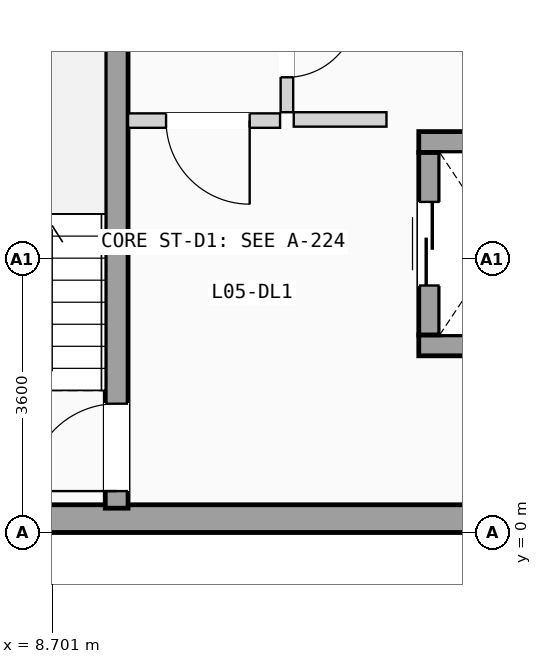
"""IFC4 building model, lengths in metres.
Left out: names, types, materials, properties, quantities, classifications, styles, units other than length and angle.
Written with IfcOpenShell. Run it as: python <this file> out.ifc"""

import sys

from ifc_helpers import new_model, si_unit, direction, frame, frame_2d, origin, place, context, subcontext, project, spatial, rectangle, extrude, element, fill, save


model = new_model("IFC4")
c1 = context("Model", 3, precision=1e-05, world=origin(), true_north=direction((0.0, 1.0)))
c2 = subcontext(c1, "Body", "Model", "MODEL_VIEW")
j1 = project(units=[si_unit("LENGTHUNIT", "METRE"), si_unit("PLANEANGLEUNIT", "RADIAN")], contexts=[c1])
p1 = place(None, origin())
s1 = spatial("IfcSite", under=j1, at=p1, CompositionType="ELEMENT")
p2 = place(p1, origin())
s2 = spatial("IfcBuilding", under=s1, at=p2, CompositionType="ELEMENT")
p3 = place(p2, frame((0.0, 0.0, 18.375)))
s3 = spatial("IfcBuildingStorey", under=s2, at=p3, CompositionType="ELEMENT", Elevation=18.375)
p4 = place(p3, frame((0.0, 0.183, 0.0), z_axis=(0.0, 0.0, 1.0), x_axis=(1.0, 0.0, 0.0)))
e1 = element("IfcWall", 1, at=p4, inside=s3, PredefinedType="SOLIDWALL", context=c2, shape_type="SweptSolid", body=[
    extrude(rectangle(XDim=21.6, YDim=0.365, at=frame_2d((10.8, 0.0))), origin(), (0.0, 0.0, 1.0), 2.89),
])
p5 = place(p3, frame((9.55, 0.32, 0.0), z_axis=(0.0, 0.0, 1.0), x_axis=(0.0, 1.0, 0.0)))
e2 = element("IfcWall", 2, at=p5, inside=s3, PredefinedType="SHEAR", context=c2, shape_type="SweptSolid", body=[
    extrude(rectangle(XDim=7.0, YDim=0.3, at=frame_2d((3.5, 0.0))), origin(), (0.0, 0.0, 1.0), 2.89),
])
p6 = place(p5, frame((0.225, 0.0, 0.0)))
e3 = element("IfcOpeningElement", 3, at=p6, cuts=e2, PredefinedType="OPENING", context=c2, shape_type="SweptSolid", body=[
    extrude(rectangle(XDim=1.15, YDim=2.12, at=frame_2d((0.575, 1.06))), frame((0.0, 0.16, 0.0), z_axis=(0.0, -1.0, 0.0), x_axis=(1.0, 0.0, 0.0)), (0.0, 0.0, 1.0), 0.32),
])
for number, where, z_axis, x_axis in (
    (4, (13.525, 2.462, 0.0), (0.0, 0.0, 1.0), (1.0, 0.0, 0.0)),
    (5, (13.525, 5.137, 0.0), (0.0, 0.0, 1.0), (1.0, 0.0, 0.0)),
):
    element("IfcWall", number, at=place(p3, frame(where, z_axis=z_axis, x_axis=x_axis)), inside=s3, PredefinedType="SHEAR", context=c2, shape_type="SweptSolid", body=[
        extrude(rectangle(XDim=2.15, YDim=0.275, at=frame_2d((1.075, 0.0))), origin(), (0.0, 0.0, 1.0), 2.89),
    ])
p7 = place(p3, frame((13.663, 2.6, 0.0), z_axis=(0.0, 0.0, 1.0), x_axis=(0.0, 1.0, 0.0)))
e6 = element("IfcWall", 6, at=p7, inside=s3, PredefinedType="SHEAR", context=c2, shape_type="SweptSolid", body=[
    extrude(rectangle(XDim=2.4, YDim=0.275, at=frame_2d((1.2, 0.0))), origin(), (0.0, 0.0, 1.0), 2.89),
])
p8 = place(p7, frame((0.65, 0.0, 0.0)))
e7 = element("IfcOpeningElement", 7, at=p8, cuts=e6, PredefinedType="OPENING", context=c2, shape_type="SweptSolid", body=[
    extrude(rectangle(XDim=1.1, YDim=2.15, at=frame_2d((0.55, 1.075))), frame((0.0, 0.147, 0.0), z_axis=(0.0, -1.0, 0.0), x_axis=(1.0, 0.0, 0.0)), (0.0, 0.0, 1.0), 0.295),
])
p9 = place(p3, frame((11.88, 5.435, 0.0), z_axis=(0.0, 0.0, 1.0), x_axis=(1.0, 0.0, 0.0)))
e8 = element("IfcWall", 8, at=p9, inside=s3, PredefinedType="PARTITIONING", context=c2, shape_type="SweptSolid", body=[
    extrude(rectangle(XDim=1.22, YDim=0.19, at=frame_2d((0.61, 0.0))), origin(), (0.0, 0.0, 1.0), 2.87),
])
p10 = place(p3, frame((9.7, 5.42, 0.0), z_axis=(0.0, 0.0, 1.0), x_axis=(1.0, 0.0, 0.0)))
e9 = element("IfcWall", 9, at=p10, inside=s3, PredefinedType="PARTITIONING", context=c2, shape_type="SweptSolid", body=[
    extrude(rectangle(XDim=2.0, YDim=0.19, at=frame_2d((1.0, 0.0))), origin(), (0.0, 0.0, 1.0), 2.87),
])
p11 = place(p10, frame((0.5, 0.0, 0.0)))
e10 = element("IfcOpeningElement", 10, at=p11, cuts=e9, PredefinedType="OPENING", context=c2, shape_type="SweptSolid", body=[
    extrude(rectangle(XDim=1.1, YDim=2.12, at=frame_2d((0.55, 1.06))), frame((0.0, 0.105, 0.0), z_axis=(0.0, -1.0, 0.0), x_axis=(1.0, 0.0, 0.0)), (0.0, 0.0, 1.0), 0.21),
])
p12 = place(p3, frame((11.79, 5.53, 0.0), z_axis=(0.0, 0.0, 1.0), x_axis=(0.0, 1.0, 0.0)))
e11 = element("IfcWall", 11, at=p12, inside=s3, PredefinedType="PARTITIONING", context=c2, shape_type="SweptSolid", body=[
    extrude(rectangle(XDim=1.82, YDim=0.165, at=frame_2d((0.91, 0.0))), origin(), (0.0, 0.0, 1.0), 2.87),
])
p13 = place(p12, frame((0.46, 0.0, 0.0)))
e12 = element("IfcOpeningElement", 12, at=p13, cuts=e11, PredefinedType="OPENING", context=c2, shape_type="SweptSolid", body=[
    extrude(rectangle(XDim=0.92, YDim=2.04, at=frame_2d((0.46, 1.02))), frame((0.0, 0.093, 0.0), z_axis=(0.0, -1.0, 0.0), x_axis=(1.0, 0.0, 0.0)), (0.0, 0.0, 1.0), 0.185),
])
p14 = place(p6, origin())
e13 = element("IfcDoor", 13, at=p14, inside=s3, OperationType="SINGLE_SWING_LEFT", PredefinedType="DOOR", context=c2, shape_type="SweptSolid", body=[
    extrude(rectangle(XDim=1.15, YDim=2.12, at=frame_2d((0.575, 1.06))), frame((0.0, 0.025, 0.0), z_axis=(0.0, -1.0, 0.0), x_axis=(1.0, 0.0, 0.0)), (0.0, 0.0, 1.0), 0.05),
])
fill(e3, e13)
p15 = place(p8, origin())
e14 = element("IfcDoor", 14, at=p15, inside=s3, OperationType="SLIDING_TO_LEFT", PredefinedType="DOOR", context=c2, shape_type="SweptSolid", body=[
    extrude(rectangle(XDim=1.1, YDim=2.15, at=frame_2d((0.55, 1.075))), frame((0.0, 0.025, 0.0), z_axis=(0.0, -1.0, 0.0), x_axis=(1.0, 0.0, 0.0)), (0.0, 0.0, 1.0), 0.05),
])
fill(e7, e14)
p16 = place(p11, frame((1.1, 0.0, 0.0), z_axis=(0.0, 0.0, 1.0), x_axis=(-1.0, 0.0, 0.0)))
e15 = element("IfcDoor", 15, at=p16, inside=s3, OperationType="SINGLE_SWING_RIGHT", PredefinedType="DOOR", context=c2, shape_type="SweptSolid", body=[
    extrude(rectangle(XDim=1.1, YDim=2.12, at=frame_2d((0.55, 1.06))), frame((0.0, 0.025, 0.0), z_axis=(0.0, -1.0, 0.0), x_axis=(1.0, 0.0, 0.0)), (0.0, 0.0, 1.0), 0.05),
])
fill(e10, e15)
p17 = place(p13, frame((0.92, 0.0, 0.0), z_axis=(0.0, 0.0, 1.0), x_axis=(-1.0, 0.0, 0.0)))
e16 = element("IfcDoor", 16, at=p17, inside=s3, OperationType="SINGLE_SWING_RIGHT", PredefinedType="DOOR", context=c2, shape_type="SweptSolid", body=[
    extrude(rectangle(XDim=0.92, YDim=2.04, at=frame_2d((0.46, 1.02))), frame((0.0, 0.025, 0.0), z_axis=(0.0, -1.0, 0.0), x_axis=(1.0, 0.0, 0.0)), (0.0, 0.0, 1.0), 0.05),
])
fill(e12, e16)
save(model, sys.argv[1])
